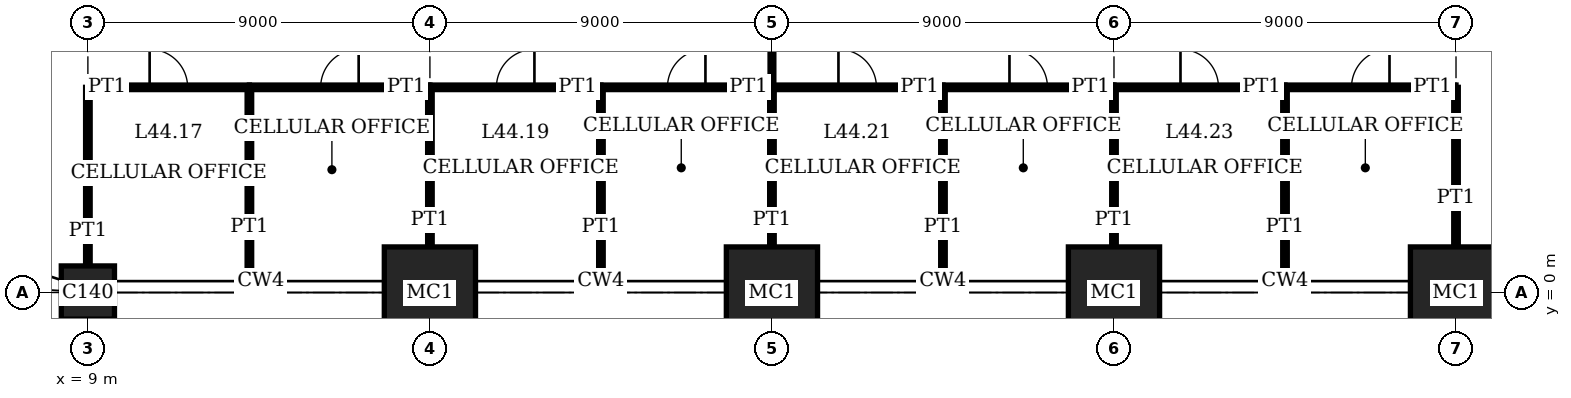
"""IFC4 building model, lengths in metres.
Left out: names, types, materials, properties, quantities, classifications, styles, units other than length and angle.
Written with IfcOpenShell. Run it as: python <this file> out.ifc"""

import sys

from ifc_helpers import new_model, si_unit, direction, frame, frame_2d, origin, origin_2d, place, context, subcontext, project, spatial, rectangle, extrude, element, fill, save


model = new_model("IFC4")
c1 = context("Model", 3, precision=1e-05, world=origin(), true_north=direction((0.0, 1.0)))
c2 = subcontext(c1, "Body", "Model", "MODEL_VIEW")
j1 = project(units=[si_unit("LENGTHUNIT", "METRE"), si_unit("PLANEANGLEUNIT", "RADIAN")], contexts=[c1])
p1 = place(None, origin())
s1 = spatial("IfcSite", under=j1, at=p1, CompositionType="ELEMENT")
p2 = place(p1, origin())
s2 = spatial("IfcBuilding", under=s1, at=p2, CompositionType="ELEMENT")
p3 = place(p2, frame((0.0, 0.0, 182.2)))
s3 = spatial("IfcBuildingStorey", under=s2, at=p3, CompositionType="ELEMENT", Elevation=182.2)
p4 = place(p3, frame((9.0, 0.0, 0.0), z_axis=(0.0, 0.0, 1.0), x_axis=(1.0, 0.0, 0.0)))
e1 = element("IfcColumn", 1, at=p4, inside=s3, PredefinedType="COLUMN", context=c2, shape_type="SweptSolid", body=[
    extrude(rectangle(XDim=1.4, YDim=1.4, at=origin_2d()), origin(), (0.0, 0.0, 1.0), 4.0),
])
for number, where, z_axis, x_axis in (
    (2, (18.0, 0.0, 0.0), (0.0, 0.0, 1.0), (1.0, 0.0, 0.0)),
    (3, (27.0, 0.0, 0.0), (0.0, 0.0, 1.0), (1.0, 0.0, 0.0)),
    (4, (36.0, 0.0, 0.0), (0.0, 0.0, 1.0), (1.0, 0.0, 0.0)),
    (5, (45.0, 0.0, 0.0), (0.0, 0.0, 1.0), (1.0, 0.0, 0.0)),
):
    element("IfcColumn", number, at=place(p3, frame(where, z_axis=z_axis, x_axis=x_axis)), inside=s3, PredefinedType="COLUMN", context=c2, shape_type="SweptSolid", body=[
        extrude(rectangle(XDim=2.4, YDim=2.4, at=origin_2d()), origin(), (0.0, 0.0, 1.0), 4.0),
    ])
p5 = place(p3, frame((9.0, 5.4, 0.0), z_axis=(0.0, 0.0, 1.0), x_axis=(1.0, 0.0, 0.0)))
e6 = element("IfcWall", 6, at=p5, inside=s3, PredefinedType="PARTITIONING", context=c2, shape_type="SweptSolid", body=[
    extrude(rectangle(XDim=4.25, YDim=0.12, at=frame_2d((2.125, 0.0))), origin(), (0.0, 0.0, 1.0), 3.75),
])
p6 = place(p5, frame((1.625, 0.0, 0.0)))
e7 = element("IfcOpeningElement", 7, at=p6, cuts=e6, PredefinedType="OPENING", context=c2, shape_type="SweptSolid", body=[
    extrude(rectangle(XDim=1.0, YDim=2.4, at=frame_2d((0.5, 1.2))), frame((0.0, 0.07, 0.0), z_axis=(0.0, -1.0, 0.0), x_axis=(1.0, 0.0, 0.0)), (0.0, 0.0, 1.0), 0.14),
])
p7 = place(p3, frame((13.25, 5.4, 0.0), z_axis=(0.0, 0.0, 1.0), x_axis=(1.0, 0.0, 0.0)))
e8 = element("IfcWall", 8, at=p7, inside=s3, PredefinedType="PARTITIONING", context=c2, shape_type="SweptSolid", body=[
    extrude(rectangle(XDim=4.75, YDim=0.12, at=frame_2d((2.375, 0.0))), origin(), (0.0, 0.0, 1.0), 3.75),
])
p8 = place(p7, frame((1.875, 0.0, 0.0)))
e9 = element("IfcOpeningElement", 9, at=p8, cuts=e8, PredefinedType="OPENING", context=c2, shape_type="SweptSolid", body=[
    extrude(rectangle(XDim=1.0, YDim=2.4, at=frame_2d((0.5, 1.2))), frame((0.0, 0.07, 0.0), z_axis=(0.0, -1.0, 0.0), x_axis=(1.0, 0.0, 0.0)), (0.0, 0.0, 1.0), 0.14),
])
p9 = place(p3, frame((18.0, 5.4, 0.0), z_axis=(0.0, 0.0, 1.0), x_axis=(1.0, 0.0, 0.0)))
e10 = element("IfcWall", 10, at=p9, inside=s3, PredefinedType="PARTITIONING", context=c2, shape_type="SweptSolid", body=[
    extrude(rectangle(XDim=4.5, YDim=0.12, at=frame_2d((2.25, 0.0))), origin(), (0.0, 0.0, 1.0), 3.75),
])
p10 = place(p9, frame((1.75, 0.0, 0.0)))
e11 = element("IfcOpeningElement", 11, at=p10, cuts=e10, PredefinedType="OPENING", context=c2, shape_type="SweptSolid", body=[
    extrude(rectangle(XDim=1.0, YDim=2.4, at=frame_2d((0.5, 1.2))), frame((0.0, 0.07, 0.0), z_axis=(0.0, -1.0, 0.0), x_axis=(1.0, 0.0, 0.0)), (0.0, 0.0, 1.0), 0.14),
])
p11 = place(p3, frame((22.5, 5.4, 0.0), z_axis=(0.0, 0.0, 1.0), x_axis=(1.0, 0.0, 0.0)))
e12 = element("IfcWall", 12, at=p11, inside=s3, PredefinedType="PARTITIONING", context=c2, shape_type="SweptSolid", body=[
    extrude(rectangle(XDim=4.5, YDim=0.12, at=frame_2d((2.25, 0.0))), origin(), (0.0, 0.0, 1.0), 3.75),
])
p12 = place(p11, frame((1.75, 0.0, 0.0)))
e13 = element("IfcOpeningElement", 13, at=p12, cuts=e12, PredefinedType="OPENING", context=c2, shape_type="SweptSolid", body=[
    extrude(rectangle(XDim=1.0, YDim=2.4, at=frame_2d((0.5, 1.2))), frame((0.0, 0.07, 0.0), z_axis=(0.0, -1.0, 0.0), x_axis=(1.0, 0.0, 0.0)), (0.0, 0.0, 1.0), 0.14),
])
p13 = place(p3, frame((27.0, 5.4, 0.0), z_axis=(0.0, 0.0, 1.0), x_axis=(1.0, 0.0, 0.0)))
e14 = element("IfcWall", 14, at=p13, inside=s3, PredefinedType="PARTITIONING", context=c2, shape_type="SweptSolid", body=[
    extrude(rectangle(XDim=4.5, YDim=0.12, at=frame_2d((2.25, 0.0))), origin(), (0.0, 0.0, 1.0), 3.75),
])
p14 = place(p13, frame((1.75, 0.0, 0.0)))
e15 = element("IfcOpeningElement", 15, at=p14, cuts=e14, PredefinedType="OPENING", context=c2, shape_type="SweptSolid", body=[
    extrude(rectangle(XDim=1.0, YDim=2.4, at=frame_2d((0.5, 1.2))), frame((0.0, 0.07, 0.0), z_axis=(0.0, -1.0, 0.0), x_axis=(1.0, 0.0, 0.0)), (0.0, 0.0, 1.0), 0.14),
])
p15 = place(p3, frame((31.5, 5.4, 0.0), z_axis=(0.0, 0.0, 1.0), x_axis=(1.0, 0.0, 0.0)))
e16 = element("IfcWall", 16, at=p15, inside=s3, PredefinedType="PARTITIONING", context=c2, shape_type="SweptSolid", body=[
    extrude(rectangle(XDim=4.5, YDim=0.12, at=frame_2d((2.25, 0.0))), origin(), (0.0, 0.0, 1.0), 3.75),
])
p16 = place(p15, frame((1.75, 0.0, 0.0)))
e17 = element("IfcOpeningElement", 17, at=p16, cuts=e16, PredefinedType="OPENING", context=c2, shape_type="SweptSolid", body=[
    extrude(rectangle(XDim=1.0, YDim=2.4, at=frame_2d((0.5, 1.2))), frame((0.0, 0.07, 0.0), z_axis=(0.0, -1.0, 0.0), x_axis=(1.0, 0.0, 0.0)), (0.0, 0.0, 1.0), 0.14),
])
p17 = place(p3, frame((36.0, 5.4, 0.0), z_axis=(0.0, 0.0, 1.0), x_axis=(1.0, 0.0, 0.0)))
e18 = element("IfcWall", 18, at=p17, inside=s3, PredefinedType="PARTITIONING", context=c2, shape_type="SweptSolid", body=[
    extrude(rectangle(XDim=4.5, YDim=0.12, at=frame_2d((2.25, 0.0))), origin(), (0.0, 0.0, 1.0), 3.75),
])
p18 = place(p17, frame((1.75, 0.0, 0.0)))
e19 = element("IfcOpeningElement", 19, at=p18, cuts=e18, PredefinedType="OPENING", context=c2, shape_type="SweptSolid", body=[
    extrude(rectangle(XDim=1.0, YDim=2.4, at=frame_2d((0.5, 1.2))), frame((0.0, 0.07, 0.0), z_axis=(0.0, -1.0, 0.0), x_axis=(1.0, 0.0, 0.0)), (0.0, 0.0, 1.0), 0.14),
])
p19 = place(p3, frame((40.5, 5.4, 0.0), z_axis=(0.0, 0.0, 1.0), x_axis=(1.0, 0.0, 0.0)))
e20 = element("IfcWall", 20, at=p19, inside=s3, PredefinedType="PARTITIONING", context=c2, shape_type="SweptSolid", body=[
    extrude(rectangle(XDim=4.5, YDim=0.12, at=frame_2d((2.25, 0.0))), origin(), (0.0, 0.0, 1.0), 3.75),
])
p20 = place(p19, frame((1.75, 0.0, 0.0)))
e21 = element("IfcOpeningElement", 21, at=p20, cuts=e20, PredefinedType="OPENING", context=c2, shape_type="SweptSolid", body=[
    extrude(rectangle(XDim=1.0, YDim=2.4, at=frame_2d((0.5, 1.2))), frame((0.0, 0.07, 0.0), z_axis=(0.0, -1.0, 0.0), x_axis=(1.0, 0.0, 0.0)), (0.0, 0.0, 1.0), 0.14),
])
p21 = place(p3, frame((9.0, 0.7, 0.0), z_axis=(0.0, 0.0, 1.0), x_axis=(0.0, 1.0, 0.0)))
e22 = element("IfcWall", 22, at=p21, inside=s3, PredefinedType="PARTITIONING", context=c2, shape_type="SweptSolid", body=[
    extrude(rectangle(XDim=4.7, YDim=0.12, at=frame_2d((2.35, 0.0))), origin(), (0.0, 0.0, 1.0), 3.05),
])
p22 = place(p3, frame((13.25, 0.31, 0.0), z_axis=(0.0, 0.0, 1.0), x_axis=(0.0, 1.0, 0.0)))
e23 = element("IfcWall", 23, at=p22, inside=s3, PredefinedType="PARTITIONING", context=c2, shape_type="SweptSolid", body=[
    extrude(rectangle(XDim=5.09, YDim=0.12, at=frame_2d((2.545, 0.0))), origin(), (0.0, 0.0, 1.0), 3.75),
])
p23 = place(p3, frame((18.0, 1.2, 0.0), z_axis=(0.0, 0.0, 1.0), x_axis=(0.0, 1.0, 0.0)))
e24 = element("IfcWall", 24, at=p23, inside=s3, PredefinedType="PARTITIONING", context=c2, shape_type="SweptSolid", body=[
    extrude(rectangle(XDim=4.2, YDim=0.12, at=frame_2d((2.1, 0.0))), origin(), (0.0, 0.0, 1.0), 3.05),
])
p24 = place(p3, frame((22.5, 0.31, 0.0), z_axis=(0.0, 0.0, 1.0), x_axis=(0.0, 1.0, 0.0)))
e25 = element("IfcWall", 25, at=p24, inside=s3, PredefinedType="PARTITIONING", context=c2, shape_type="SweptSolid", body=[
    extrude(rectangle(XDim=5.09, YDim=0.12, at=frame_2d((2.545, 0.0))), origin(), (0.0, 0.0, 1.0), 3.75),
])
p25 = place(p3, frame((27.0, 1.2, 0.0), z_axis=(0.0, 0.0, 1.0), x_axis=(0.0, 1.0, 0.0)))
e26 = element("IfcWall", 26, at=p25, inside=s3, PredefinedType="PARTITIONING", context=c2, shape_type="SweptSolid", body=[
    extrude(rectangle(XDim=4.2, YDim=0.12, at=frame_2d((2.1, 0.0))), origin(), (0.0, 0.0, 1.0), 3.05),
])
p26 = place(p3, frame((27.0, 5.4, 0.0), z_axis=(0.0, 0.0, 1.0), x_axis=(0.0, 1.0, 0.0)))
e27 = element("IfcWall", 27, at=p26, inside=s3, PredefinedType="PARTITIONING", context=c2, shape_type="SweptSolid", body=[
    extrude(rectangle(XDim=2.8, YDim=0.1, at=frame_2d((1.4, 0.0))), origin(), (0.0, 0.0, 1.0), 3.05),
])
p27 = place(p3, frame((31.5, 0.31, 0.0), z_axis=(0.0, 0.0, 1.0), x_axis=(0.0, 1.0, 0.0)))
e28 = element("IfcWall", 28, at=p27, inside=s3, PredefinedType="PARTITIONING", context=c2, shape_type="SweptSolid", body=[
    extrude(rectangle(XDim=5.09, YDim=0.12, at=frame_2d((2.545, 0.0))), origin(), (0.0, 0.0, 1.0), 3.75),
])
p28 = place(p3, frame((36.0, 1.2, 0.0), z_axis=(0.0, 0.0, 1.0), x_axis=(0.0, 1.0, 0.0)))
e29 = element("IfcWall", 29, at=p28, inside=s3, PredefinedType="PARTITIONING", context=c2, shape_type="SweptSolid", body=[
    extrude(rectangle(XDim=4.2, YDim=0.12, at=frame_2d((2.1, 0.0))), origin(), (0.0, 0.0, 1.0), 3.05),
])
p29 = place(p3, frame((40.5, 0.31, 0.0), z_axis=(0.0, 0.0, 1.0), x_axis=(0.0, 1.0, 0.0)))
e30 = element("IfcWall", 30, at=p29, inside=s3, PredefinedType="PARTITIONING", context=c2, shape_type="SweptSolid", body=[
    extrude(rectangle(XDim=5.09, YDim=0.12, at=frame_2d((2.545, 0.0))), origin(), (0.0, 0.0, 1.0), 3.75),
])
p30 = place(p3, frame((45.0, 1.2, 0.0), z_axis=(0.0, 0.0, 1.0), x_axis=(0.0, 1.0, 0.0)))
e31 = element("IfcWall", 31, at=p30, inside=s3, PredefinedType="PARTITIONING", context=c2, shape_type="SweptSolid", body=[
    extrude(rectangle(XDim=4.2, YDim=0.12, at=frame_2d((2.1, 0.0))), origin(), (0.0, 0.0, 1.0), 3.05),
])
p31 = place(p6, origin())
e32 = element("IfcDoor", 32, at=p31, inside=s3, OperationType="SINGLE_SWING_RIGHT", PredefinedType="DOOR", context=c2, shape_type="SweptSolid", body=[
    extrude(rectangle(XDim=1.0, YDim=2.4, at=frame_2d((0.5, 1.2))), frame((0.0, 0.025, 0.0), z_axis=(0.0, -1.0, 0.0), x_axis=(1.0, 0.0, 0.0)), (0.0, 0.0, 1.0), 0.05),
])
fill(e7, e32)
p32 = place(p8, origin())
e33 = element("IfcDoor", 33, at=p32, inside=s3, OperationType="SINGLE_SWING_LEFT", PredefinedType="DOOR", context=c2, shape_type="SweptSolid", body=[
    extrude(rectangle(XDim=1.0, YDim=2.4, at=frame_2d((0.5, 1.2))), frame((0.0, 0.025, 0.0), z_axis=(0.0, -1.0, 0.0), x_axis=(1.0, 0.0, 0.0)), (0.0, 0.0, 1.0), 0.05),
])
fill(e9, e33)
p33 = place(p10, origin())
e34 = element("IfcDoor", 34, at=p33, inside=s3, OperationType="SINGLE_SWING_LEFT", PredefinedType="DOOR", context=c2, shape_type="SweptSolid", body=[
    extrude(rectangle(XDim=1.0, YDim=2.4, at=frame_2d((0.5, 1.2))), frame((0.0, 0.025, 0.0), z_axis=(0.0, -1.0, 0.0), x_axis=(1.0, 0.0, 0.0)), (0.0, 0.0, 1.0), 0.05),
])
fill(e11, e34)
p34 = place(p12, origin())
e35 = element("IfcDoor", 35, at=p34, inside=s3, OperationType="SINGLE_SWING_LEFT", PredefinedType="DOOR", context=c2, shape_type="SweptSolid", body=[
    extrude(rectangle(XDim=1.0, YDim=2.4, at=frame_2d((0.5, 1.2))), frame((0.0, 0.025, 0.0), z_axis=(0.0, -1.0, 0.0), x_axis=(1.0, 0.0, 0.0)), (0.0, 0.0, 1.0), 0.05),
])
fill(e13, e35)
p35 = place(p14, origin())
e36 = element("IfcDoor", 36, at=p35, inside=s3, OperationType="SINGLE_SWING_RIGHT", PredefinedType="DOOR", context=c2, shape_type="SweptSolid", body=[
    extrude(rectangle(XDim=1.0, YDim=2.4, at=frame_2d((0.5, 1.2))), frame((0.0, 0.025, 0.0), z_axis=(0.0, -1.0, 0.0), x_axis=(1.0, 0.0, 0.0)), (0.0, 0.0, 1.0), 0.05),
])
fill(e15, e36)
p36 = place(p16, origin())
e37 = element("IfcDoor", 37, at=p36, inside=s3, OperationType="SINGLE_SWING_RIGHT", PredefinedType="DOOR", context=c2, shape_type="SweptSolid", body=[
    extrude(rectangle(XDim=1.0, YDim=2.4, at=frame_2d((0.5, 1.2))), frame((0.0, 0.025, 0.0), z_axis=(0.0, -1.0, 0.0), x_axis=(1.0, 0.0, 0.0)), (0.0, 0.0, 1.0), 0.05),
])
fill(e17, e37)
p37 = place(p18, origin())
e38 = element("IfcDoor", 38, at=p37, inside=s3, OperationType="SINGLE_SWING_RIGHT", PredefinedType="DOOR", context=c2, shape_type="SweptSolid", body=[
    extrude(rectangle(XDim=1.0, YDim=2.4, at=frame_2d((0.5, 1.2))), frame((0.0, 0.025, 0.0), z_axis=(0.0, -1.0, 0.0), x_axis=(1.0, 0.0, 0.0)), (0.0, 0.0, 1.0), 0.05),
])
fill(e19, e38)
p38 = place(p20, origin())
e39 = element("IfcDoor", 39, at=p38, inside=s3, OperationType="SINGLE_SWING_LEFT", PredefinedType="DOOR", context=c2, shape_type="SweptSolid", body=[
    extrude(rectangle(XDim=1.0, YDim=2.4, at=frame_2d((0.5, 1.2))), frame((0.0, 0.025, 0.0), z_axis=(0.0, -1.0, 0.0), x_axis=(1.0, 0.0, 0.0)), (0.0, 0.0, 1.0), 0.05),
])
fill(e21, e39)
save(model, sys.argv[1])
